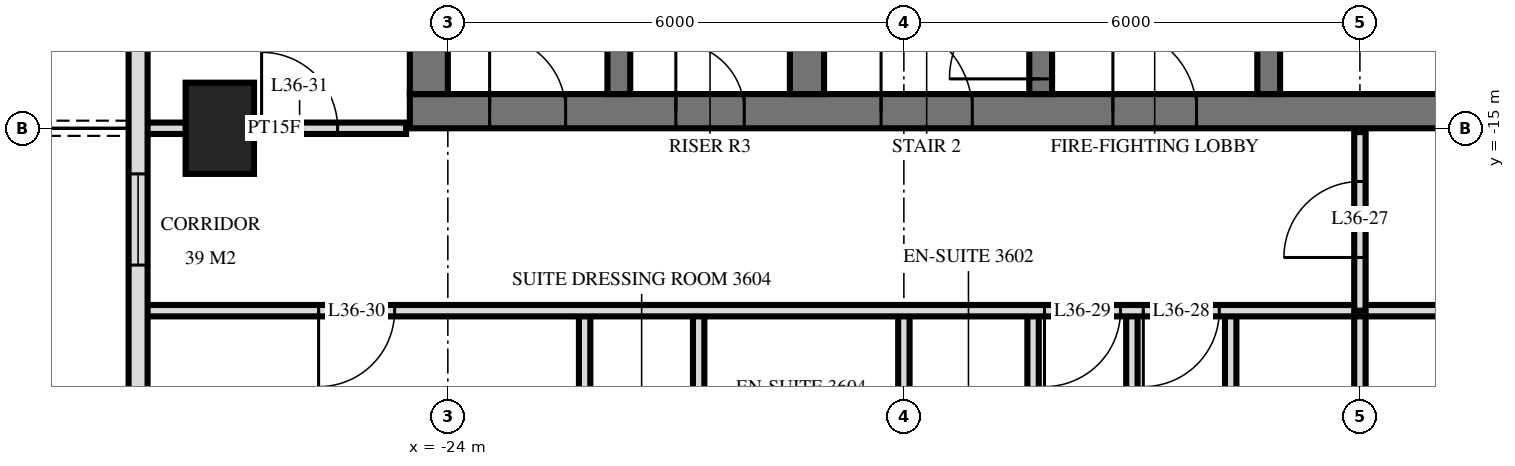
"""IFC4 building model, lengths in metres.
Left out: names, types, materials, properties, quantities, classifications, styles, units other than length and angle.
Written with IfcOpenShell. Run it as: python <this file> out.ifc"""

import sys

from ifc_helpers import new_model, si_unit, direction, frame, frame_2d, origin, origin_2d, place, context, subcontext, project, spatial, rectangle, extrude, element, fill, save


model = new_model("IFC4")
c1 = context("Model", 3, precision=1e-05, world=origin(), true_north=direction((0.0, 1.0)))
c2 = subcontext(c1, "Body", "Model", "MODEL_VIEW")
j1 = project(units=[si_unit("LENGTHUNIT", "METRE"), si_unit("PLANEANGLEUNIT", "RADIAN")], contexts=[c1])
p1 = place(None, origin())
s1 = spatial("IfcSite", under=j1, at=p1, CompositionType="ELEMENT")
p2 = place(p1, origin())
s2 = spatial("IfcBuilding", under=s1, at=p2, CompositionType="ELEMENT")
p3 = place(p2, frame((0.0, 0.0, 141.6)))
s3 = spatial("IfcBuildingStorey", under=s2, at=p3, CompositionType="ELEMENT", Elevation=141.6)
p4 = place(p3, frame((-27.0, -15.0, 0.0), z_axis=(0.0, 0.0, 1.0), x_axis=(0.0, 1.0, 0.0)))
e1 = element("IfcColumn", 1, at=p4, inside=s3, PredefinedType="COLUMN", context=c2, shape_type="SweptSolid", body=[
    extrude(rectangle(XDim=1.2, YDim=0.9, at=origin_2d()), origin(), (0.0, 0.0, 1.0), 3.6),
])
p5 = place(p3, frame((-24.5, -14.775, 0.0), z_axis=(0.0, 0.0, 1.0), x_axis=(1.0, 0.0, 0.0)))
e2 = element("IfcWall", 2, at=p5, inside=s3, PredefinedType="SHEAR", context=c2, shape_type="SweptSolid", body=[
    extrude(rectangle(XDim=14.5, YDim=0.45, at=frame_2d((7.25, 0.0))), origin(), (0.0, 0.0, 1.0), 3.6),
])
p6 = place(p5, frame((6.2, 0.0, 0.0)))
e3 = element("IfcOpeningElement", 3, at=p6, cuts=e2, PredefinedType="OPENING", context=c2, shape_type="SweptSolid", body=[
    extrude(rectangle(XDim=1.2, YDim=2.1, at=frame_2d((0.6, 1.05))), frame((0.0, 0.235, 0.0), z_axis=(0.0, -1.0, 0.0), x_axis=(1.0, 0.0, 0.0)), (0.0, 0.0, 1.0), 0.47),
])
p7 = place(p5, frame((9.25, 0.0, 0.0)))
e4 = element("IfcOpeningElement", 4, at=p7, cuts=e2, PredefinedType="OPENING", context=c2, shape_type="SweptSolid", body=[
    extrude(rectangle(XDim=1.1, YDim=2.1, at=frame_2d((0.55, 1.05))), frame((0.0, 0.235, 0.0), z_axis=(0.0, -1.0, 0.0), x_axis=(1.0, 0.0, 0.0)), (0.0, 0.0, 1.0), 0.47),
])
p8 = place(p5, frame((3.5, 0.0, 0.0)))
e5 = element("IfcOpeningElement", 5, at=p8, cuts=e2, PredefinedType="OPENING", context=c2, shape_type="SweptSolid", body=[
    extrude(rectangle(XDim=0.9, YDim=2.1, at=frame_2d((0.45, 1.05))), frame((0.0, 0.235, 0.0), z_axis=(0.0, -1.0, 0.0), x_axis=(1.0, 0.0, 0.0)), (0.0, 0.0, 1.0), 0.47),
])
p9 = place(p5, frame((1.05, 0.0, 0.0)))
e6 = element("IfcOpeningElement", 6, at=p9, cuts=e2, PredefinedType="OPENING", context=c2, shape_type="SweptSolid", body=[
    extrude(rectangle(XDim=1.0, YDim=2.1, at=frame_2d((0.5, 1.05))), frame((0.0, 0.235, 0.0), z_axis=(0.0, -1.0, 0.0), x_axis=(1.0, 0.0, 0.0)), (0.0, 0.0, 1.0), 0.47),
])
p10 = place(p3, frame((-24.25, -14.55, 0.0), z_axis=(0.0, 0.0, 1.0), x_axis=(0.0, 1.0, 0.0)))
e7 = element("IfcWall", 7, at=p10, inside=s3, PredefinedType="SHEAR", context=c2, shape_type="SweptSolid", body=[
    extrude(rectangle(XDim=14.1, YDim=0.5, at=frame_2d((7.05, 0.0))), origin(), (0.0, 0.0, 1.0), 3.6),
])
p11 = place(p3, frame((-13.2, -14.55, 0.0), z_axis=(0.0, 0.0, 1.0), x_axis=(0.0, 1.0, 0.0)))
e8 = element("IfcWall", 8, at=p11, inside=s3, PredefinedType="SHEAR", context=c2, shape_type="SweptSolid", body=[
    extrude(rectangle(XDim=5.4, YDim=0.3, at=frame_2d((2.7, 0.0))), origin(), (0.0, 0.0, 1.0), 3.6),
])
p12 = place(p11, frame((4.0, 0.0, 0.0)))
e9 = element("IfcOpeningElement", 9, at=p12, cuts=e8, PredefinedType="OPENING", context=c2, shape_type="SweptSolid", body=[
    extrude(rectangle(XDim=1.2, YDim=2.1, at=frame_2d((0.6, 1.05))), frame((0.0, 0.16, 0.0), z_axis=(0.0, -1.0, 0.0), x_axis=(1.0, 0.0, 0.0)), (0.0, 0.0, 1.0), 0.32),
])
p13 = place(p3, frame((-16.2, -14.55, 0.0), z_axis=(0.0, 0.0, 1.0), x_axis=(0.0, 1.0, 0.0)))
e10 = element("IfcWall", 10, at=p13, inside=s3, PredefinedType="SHEAR", context=c2, shape_type="SweptSolid", body=[
    extrude(rectangle(XDim=5.4, YDim=0.3, at=frame_2d((2.7, 0.0))), origin(), (0.0, 0.0, 1.0), 3.6),
])
p14 = place(p13, frame((0.2, 0.0, 0.0)))
e11 = element("IfcOpeningElement", 11, at=p14, cuts=e10, PredefinedType="OPENING", context=c2, shape_type="SweptSolid", body=[
    extrude(rectangle(XDim=1.2, YDim=2.1, at=frame_2d((0.6, 1.05))), frame((0.0, 0.16, 0.0), z_axis=(0.0, -1.0, 0.0), x_axis=(1.0, 0.0, 0.0)), (0.0, 0.0, 1.0), 0.32),
])
p15 = place(p3, frame((-19.275, -14.55, 0.0), z_axis=(0.0, 0.0, 1.0), x_axis=(0.0, 1.0, 0.0)))
e12 = element("IfcWall", 12, at=p15, inside=s3, PredefinedType="SHEAR", context=c2, shape_type="SweptSolid", body=[
    extrude(rectangle(XDim=5.4, YDim=0.45, at=frame_2d((2.7, 0.0))), origin(), (0.0, 0.0, 1.0), 3.6),
])
p16 = place(p3, frame((-21.75, -14.55, 0.0), z_axis=(0.0, 0.0, 1.0), x_axis=(0.0, 1.0, 0.0)))
e13 = element("IfcWall", 13, at=p16, inside=s3, PredefinedType="SHEAR", context=c2, shape_type="SweptSolid", body=[
    extrude(rectangle(XDim=5.4, YDim=0.3, at=frame_2d((2.7, 0.0))), origin(), (0.0, 0.0, 1.0), 3.6),
])
p17 = place(p3, frame((-28.075, -3.325, 0.0), z_axis=(0.0, 0.0, 1.0), x_axis=(0.0, -1.0, 0.0)))
e14 = element("IfcWall", 14, at=p17, inside=s3, PredefinedType="SOLIDWALL", context=c2, shape_type="SweptSolid", body=[
    extrude(rectangle(XDim=25.951, YDim=0.25, at=frame_2d((12.975, 0.0))), origin(), (0.0, 0.0, 1.0), 3.32),
])
p18 = place(p17, frame((6.65, 0.0, 0.0)))
e15 = element("IfcOpeningElement", 15, at=p18, cuts=e14, PredefinedType="OPENING", context=c2, shape_type="SweptSolid", body=[
    extrude(rectangle(XDim=1.8, YDim=2.4, at=frame_2d((0.9, 1.2))), frame((0.0, 0.135, 0.0), z_axis=(0.0, -1.0, 0.0), x_axis=(1.0, 0.0, 0.0)), (0.0, 0.0, 1.0), 0.27),
])
p19 = place(p17, frame((12.275, 0.0, 0.3)))
e16 = element("IfcOpeningElement", 16, at=p19, cuts=e14, PredefinedType="OPENING", context=c2, shape_type="SweptSolid", body=[
    extrude(rectangle(XDim=1.2, YDim=2.1, at=frame_2d((0.6, 1.05))), frame((0.0, 0.135, 0.0), z_axis=(0.0, -1.0, 0.0), x_axis=(1.0, 0.0, 0.0)), (0.0, 0.0, 1.0), 0.27),
])
p20 = place(p17, frame((15.575, 0.0, 0.3)))
e17 = element("IfcOpeningElement", 17, at=p20, cuts=e14, PredefinedType="OPENING", context=c2, shape_type="SweptSolid", body=[
    extrude(rectangle(XDim=1.2, YDim=2.1, at=frame_2d((0.6, 1.05))), frame((0.0, 0.135, 0.0), z_axis=(0.0, -1.0, 0.0), x_axis=(1.0, 0.0, 0.0)), (0.0, 0.0, 1.0), 0.27),
])
p21 = place(p17, frame((18.175, 0.0, 0.0)))
e18 = element("IfcOpeningElement", 18, at=p21, cuts=e14, PredefinedType="OPENING", context=c2, shape_type="SweptSolid", body=[
    extrude(rectangle(XDim=1.8, YDim=2.4, at=frame_2d((0.9, 1.2))), frame((0.0, 0.135, 0.0), z_axis=(0.0, -1.0, 0.0), x_axis=(1.0, 0.0, 0.0)), (0.0, 0.0, 1.0), 0.27),
])
p22 = place(p17, frame((21.075, 0.0, 0.0)))
e19 = element("IfcOpeningElement", 19, at=p22, cuts=e14, PredefinedType="OPENING", context=c2, shape_type="SweptSolid", body=[
    extrude(rectangle(XDim=1.8, YDim=2.4, at=frame_2d((0.9, 1.2))), frame((0.0, 0.135, 0.0), z_axis=(0.0, -1.0, 0.0), x_axis=(1.0, 0.0, 0.0)), (0.0, 0.0, 1.0), 0.27),
])
p23 = place(p17, frame((23.825, 0.0, 0.3)))
e20 = element("IfcOpeningElement", 20, at=p23, cuts=e14, PredefinedType="OPENING", context=c2, shape_type="SweptSolid", body=[
    extrude(rectangle(XDim=1.8, YDim=2.1, at=frame_2d((0.9, 1.05))), frame((0.0, 0.135, 0.0), z_axis=(0.0, -1.0, 0.0), x_axis=(1.0, 0.0, 0.0)), (0.0, 0.0, 1.0), 0.27),
])
p24 = place(p3, frame((-12.0, -17.4, 0.0), z_axis=(0.0, 0.0, 1.0), x_axis=(0.0, 1.0, 0.0)))
e21 = element("IfcWall", 21, at=p24, inside=s3, PredefinedType="PARTITIONING", context=c2, shape_type="SweptSolid", body=[
    extrude(rectangle(XDim=2.35, YDim=0.15, at=frame_2d((1.175, 0.0))), origin(), (0.0, 0.0, 1.0), 3.32),
])
p25 = place(p24, frame((0.7, 0.0, 0.0)))
e22 = element("IfcOpeningElement", 22, at=p25, cuts=e21, PredefinedType="OPENING", context=c2, shape_type="SweptSolid", body=[
    extrude(rectangle(XDim=1.0, YDim=2.1, at=frame_2d((0.5, 1.05))), frame((0.0, 0.085, 0.0), z_axis=(0.0, -1.0, 0.0), x_axis=(1.0, 0.0, 0.0)), (0.0, 0.0, 1.0), 0.17),
])
p26 = place(p3, frame((-12.0, -33.62, 0.0), z_axis=(0.0, 0.0, 1.0), x_axis=(0.0, 1.0, 0.0)))
e23 = element("IfcWall", 23, at=p26, inside=s3, PredefinedType="PARTITIONING", context=c2, shape_type="SweptSolid", body=[
    extrude(rectangle(XDim=16.22, YDim=0.15, at=frame_2d((8.11, 0.0))), origin(), (0.0, 0.0, 1.0), 3.32),
])
p27 = place(p3, frame((-13.7, -21.2, 0.0), z_axis=(0.0, 0.0, 1.0), x_axis=(0.0, 1.0, 0.0)))
e24 = element("IfcWall", 24, at=p27, inside=s3, PredefinedType="PARTITIONING", context=c2, shape_type="SweptSolid", body=[
    extrude(rectangle(XDim=3.8, YDim=0.15, at=frame_2d((1.9, 0.0))), origin(), (0.0, 0.0, 1.0), 3.32),
])
p28 = place(p27, frame((1.5, 0.0, 0.0)))
e25 = element("IfcOpeningElement", 25, at=p28, cuts=e24, PredefinedType="OPENING", context=c2, shape_type="SweptSolid", body=[
    extrude(rectangle(XDim=0.8, YDim=2.1, at=frame_2d((0.4, 1.05))), frame((0.0, 0.085, 0.0), z_axis=(0.0, -1.0, 0.0), x_axis=(1.0, 0.0, 0.0)), (0.0, 0.0, 1.0), 0.17),
])
p29 = place(p3, frame((-15.0, -33.62, 0.0), z_axis=(0.0, 0.0, 1.0), x_axis=(0.0, 1.0, 0.0)))
e26 = element("IfcWall", 26, at=p29, inside=s3, PredefinedType="PARTITIONING", context=c2, shape_type="SweptSolid", body=[
    extrude(rectangle(XDim=16.22, YDim=0.15, at=frame_2d((8.11, 0.0))), origin(), (0.0, 0.0, 1.0), 3.32),
])
p30 = place(p3, frame((-16.3, -21.2, 0.0), z_axis=(0.0, 0.0, 1.0), x_axis=(0.0, 1.0, 0.0)))
e27 = element("IfcWall", 27, at=p30, inside=s3, PredefinedType="PARTITIONING", context=c2, shape_type="SweptSolid", body=[
    extrude(rectangle(XDim=3.8, YDim=0.15, at=frame_2d((1.9, 0.0))), origin(), (0.0, 0.0, 1.0), 3.32),
])
p31 = place(p30, frame((1.5, 0.0, 0.0)))
e28 = element("IfcOpeningElement", 28, at=p31, cuts=e27, PredefinedType="OPENING", context=c2, shape_type="SweptSolid", body=[
    extrude(rectangle(XDim=0.8, YDim=2.1, at=frame_2d((0.4, 1.05))), frame((0.0, 0.085, 0.0), z_axis=(0.0, -1.0, 0.0), x_axis=(1.0, 0.0, 0.0)), (0.0, 0.0, 1.0), 0.17),
])
p32 = place(p3, frame((-18.0, -33.62, 0.0), z_axis=(0.0, 0.0, 1.0), x_axis=(0.0, 1.0, 0.0)))
e29 = element("IfcWall", 29, at=p32, inside=s3, PredefinedType="PARTITIONING", context=c2, shape_type="SweptSolid", body=[
    extrude(rectangle(XDim=16.22, YDim=0.15, at=frame_2d((8.11, 0.0))), origin(), (0.0, 0.0, 1.0), 3.32),
])
p33 = place(p3, frame((-20.7, -20.4, 0.0), z_axis=(0.0, 0.0, 1.0), x_axis=(0.0, 1.0, 0.0)))
e30 = element("IfcWall", 30, at=p33, inside=s3, PredefinedType="PARTITIONING", context=c2, shape_type="SweptSolid", body=[
    extrude(rectangle(XDim=3.0, YDim=0.15, at=frame_2d((1.5, 0.0))), origin(), (0.0, 0.0, 1.0), 3.32),
])
p34 = place(p3, frame((-22.2, -20.4, 0.0), z_axis=(0.0, 0.0, 1.0), x_axis=(0.0, 1.0, 0.0)))
e31 = element("IfcWall", 31, at=p34, inside=s3, PredefinedType="PARTITIONING", context=c2, shape_type="SweptSolid", body=[
    extrude(rectangle(XDim=3.0, YDim=0.15, at=frame_2d((1.5, 0.0))), origin(), (0.0, 0.0, 1.0), 3.32),
])
p35 = place(p34, frame((1.05, 0.0, 0.0)))
e32 = element("IfcOpeningElement", 32, at=p35, cuts=e31, PredefinedType="OPENING", context=c2, shape_type="SweptSolid", body=[
    extrude(rectangle(XDim=0.9, YDim=2.1, at=frame_2d((0.45, 1.05))), frame((0.0, 0.085, 0.0), z_axis=(0.0, -1.0, 0.0), x_axis=(1.0, 0.0, 0.0)), (0.0, 0.0, 1.0), 0.17),
])
p36 = place(p3, frame((-28.02, -17.4, 0.0), z_axis=(0.0, 0.0, 1.0), x_axis=(1.0, 0.0, 0.0)))
e33 = element("IfcWall", 33, at=p36, inside=s3, PredefinedType="PARTITIONING", context=c2, shape_type="SweptSolid", body=[
    extrude(rectangle(XDim=56.04, YDim=0.15, at=frame_2d((28.02, 0.0))), origin(), (0.0, 0.0, 1.0), 3.32),
])
p37 = place(p36, frame((13.17, 0.0, 0.0)))
e34 = element("IfcOpeningElement", 34, at=p37, cuts=e33, PredefinedType="OPENING", context=c2, shape_type="SweptSolid", body=[
    extrude(rectangle(XDim=1.0, YDim=2.1, at=frame_2d((0.5, 1.05))), frame((0.0, 0.085, 0.0), z_axis=(0.0, -1.0, 0.0), x_axis=(1.0, 0.0, 0.0)), (0.0, 0.0, 1.0), 0.17),
])
p38 = place(p36, frame((11.87, 0.0, 0.0)))
e35 = element("IfcOpeningElement", 35, at=p38, cuts=e33, PredefinedType="OPENING", context=c2, shape_type="SweptSolid", body=[
    extrude(rectangle(XDim=1.0, YDim=2.1, at=frame_2d((0.5, 1.05))), frame((0.0, 0.085, 0.0), z_axis=(0.0, -1.0, 0.0), x_axis=(1.0, 0.0, 0.0)), (0.0, 0.0, 1.0), 0.17),
])
p39 = place(p36, frame((2.32, 0.0, 0.0)))
e36 = element("IfcOpeningElement", 36, at=p39, cuts=e33, PredefinedType="OPENING", context=c2, shape_type="SweptSolid", body=[
    extrude(rectangle(XDim=1.0, YDim=2.1, at=frame_2d((0.5, 1.05))), frame((0.0, 0.085, 0.0), z_axis=(0.0, -1.0, 0.0), x_axis=(1.0, 0.0, 0.0)), (0.0, 0.0, 1.0), 0.17),
])
p40 = place(p36, frame((40.17, 0.0, 0.0)))
e37 = element("IfcOpeningElement", 37, at=p40, cuts=e33, PredefinedType="OPENING", context=c2, shape_type="SweptSolid", body=[
    extrude(rectangle(XDim=1.0, YDim=2.1, at=frame_2d((0.5, 1.05))), frame((0.0, 0.085, 0.0), z_axis=(0.0, -1.0, 0.0), x_axis=(1.0, 0.0, 0.0)), (0.0, 0.0, 1.0), 0.17),
])
p41 = place(p36, frame((51.22, 0.0, 0.0)))
e38 = element("IfcOpeningElement", 38, at=p41, cuts=e33, PredefinedType="OPENING", context=c2, shape_type="SweptSolid", body=[
    extrude(rectangle(XDim=1.0, YDim=2.1, at=frame_2d((0.5, 1.05))), frame((0.0, 0.085, 0.0), z_axis=(0.0, -1.0, 0.0), x_axis=(1.0, 0.0, 0.0)), (0.0, 0.0, 1.0), 0.17),
])
p42 = place(p36, frame((18.52, 0.0, 0.0)))
e39 = element("IfcOpeningElement", 39, at=p42, cuts=e33, PredefinedType="OPENING", context=c2, shape_type="SweptSolid", body=[
    extrude(rectangle(XDim=1.0, YDim=2.1, at=frame_2d((0.5, 1.05))), frame((0.0, 0.085, 0.0), z_axis=(0.0, -1.0, 0.0), x_axis=(1.0, 0.0, 0.0)), (0.0, 0.0, 1.0), 0.17),
])
p43 = place(p36, frame((26.02, 0.0, 0.0)))
e40 = element("IfcOpeningElement", 40, at=p43, cuts=e33, PredefinedType="OPENING", context=c2, shape_type="SweptSolid", body=[
    extrude(rectangle(XDim=1.0, YDim=2.1, at=frame_2d((0.5, 1.05))), frame((0.0, 0.085, 0.0), z_axis=(0.0, -1.0, 0.0), x_axis=(1.0, 0.0, 0.0)), (0.0, 0.0, 1.0), 0.17),
])
p44 = place(p36, frame((35.02, 0.0, 0.0)))
e41 = element("IfcOpeningElement", 41, at=p44, cuts=e33, PredefinedType="OPENING", context=c2, shape_type="SweptSolid", body=[
    extrude(rectangle(XDim=1.0, YDim=2.1, at=frame_2d((0.5, 1.05))), frame((0.0, 0.085, 0.0), z_axis=(0.0, -1.0, 0.0), x_axis=(1.0, 0.0, 0.0)), (0.0, 0.0, 1.0), 0.17),
])
p45 = place(p3, frame((-28.02, -15.0, 0.0), z_axis=(0.0, 0.0, 1.0), x_axis=(1.0, 0.0, 0.0)))
e42 = element("IfcWall", 42, at=p45, inside=s3, PredefinedType="PARTITIONING", context=c2, shape_type="SweptSolid", body=[
    extrude(rectangle(XDim=3.47, YDim=0.15, at=frame_2d((1.735, 0.0))), origin(), (0.0, 0.0, 1.0), 3.32),
])
p46 = place(p45, frame((1.57, 0.0, 0.0)))
e43 = element("IfcOpeningElement", 43, at=p46, cuts=e42, PredefinedType="OPENING", context=c2, shape_type="SweptSolid", body=[
    extrude(rectangle(XDim=1.0, YDim=2.1, at=frame_2d((0.5, 1.05))), frame((0.0, 0.085, 0.0), z_axis=(0.0, -1.0, 0.0), x_axis=(1.0, 0.0, 0.0)), (0.0, 0.0, 1.0), 0.17),
])
p47 = place(p19, origin())
e44 = element("IfcWindow", 44, at=p47, inside=s3, PartitioningType="SINGLE_PANEL", PredefinedType="WINDOW", context=c2, shape_type="SweptSolid", body=[
    extrude(rectangle(XDim=1.2, YDim=2.1, at=frame_2d((0.6, 1.05))), frame((0.0, 0.03, 0.0), z_axis=(0.0, -1.0, 0.0), x_axis=(1.0, 0.0, 0.0)), (0.0, 0.0, 1.0), 0.06),
])
fill(e16, e44)
p48 = place(p6, origin())
e45 = element("IfcDoor", 45, at=p48, inside=s3, OperationType="SINGLE_SWING_RIGHT", PredefinedType="DOOR", context=c2, shape_type="SweptSolid", body=[
    extrude(rectangle(XDim=1.2, YDim=2.1, at=frame_2d((0.6, 1.05))), frame((0.0, 0.025, 0.0), z_axis=(0.0, -1.0, 0.0), x_axis=(1.0, 0.0, 0.0)), (0.0, 0.0, 1.0), 0.05),
])
fill(e3, e45)
p49 = place(p7, origin())
e46 = element("IfcDoor", 46, at=p49, inside=s3, OperationType="SINGLE_SWING_RIGHT", PredefinedType="DOOR", context=c2, shape_type="SweptSolid", body=[
    extrude(rectangle(XDim=1.1, YDim=2.1, at=frame_2d((0.55, 1.05))), frame((0.0, 0.025, 0.0), z_axis=(0.0, -1.0, 0.0), x_axis=(1.0, 0.0, 0.0)), (0.0, 0.0, 1.0), 0.05),
])
fill(e4, e46)
p50 = place(p8, origin())
e47 = element("IfcDoor", 47, at=p50, inside=s3, OperationType="SINGLE_SWING_RIGHT", PredefinedType="DOOR", context=c2, shape_type="SweptSolid", body=[
    extrude(rectangle(XDim=0.9, YDim=2.1, at=frame_2d((0.45, 1.05))), frame((0.0, 0.025, 0.0), z_axis=(0.0, -1.0, 0.0), x_axis=(1.0, 0.0, 0.0)), (0.0, 0.0, 1.0), 0.05),
])
fill(e5, e47)
p51 = place(p9, origin())
e48 = element("IfcDoor", 48, at=p51, inside=s3, OperationType="SINGLE_SWING_RIGHT", PredefinedType="DOOR", context=c2, shape_type="SweptSolid", body=[
    extrude(rectangle(XDim=1.0, YDim=2.1, at=frame_2d((0.5, 1.05))), frame((0.0, 0.025, 0.0), z_axis=(0.0, -1.0, 0.0), x_axis=(1.0, 0.0, 0.0)), (0.0, 0.0, 1.0), 0.05),
])
fill(e6, e48)
p52 = place(p14, origin())
e49 = element("IfcDoor", 49, at=p52, inside=s3, OperationType="SINGLE_SWING_RIGHT", PredefinedType="DOOR", context=c2, shape_type="SweptSolid", body=[
    extrude(rectangle(XDim=1.2, YDim=2.1, at=frame_2d((0.6, 1.05))), frame((0.0, 0.025, 0.0), z_axis=(0.0, -1.0, 0.0), x_axis=(1.0, 0.0, 0.0)), (0.0, 0.0, 1.0), 0.05),
])
fill(e11, e49)
p53 = place(p25, origin())
e50 = element("IfcDoor", 50, at=p53, inside=s3, OperationType="SINGLE_SWING_RIGHT", PredefinedType="DOOR", context=c2, shape_type="SweptSolid", body=[
    extrude(rectangle(XDim=1.0, YDim=2.1, at=frame_2d((0.5, 1.05))), frame((0.0, 0.025, 0.0), z_axis=(0.0, -1.0, 0.0), x_axis=(1.0, 0.0, 0.0)), (0.0, 0.0, 1.0), 0.05),
])
fill(e22, e50)
p54 = place(p37, frame((0.5, 0.0, 0.0), z_axis=(0.0, 0.0, 1.0), x_axis=(-1.0, 0.0, 0.0)))
e51 = element("IfcDoor", 51, at=p54, inside=s3, OperationType="SINGLE_SWING_LEFT", PredefinedType="DOOR", context=c2, shape_type="SweptSolid", body=[
    extrude(rectangle(XDim=1.0, YDim=2.1, at=frame_2d((0.0, 1.05))), frame((0.0, -0.025, 0.0), z_axis=(0.0, 1.0, 0.0), x_axis=(-1.0, 0.0, 0.0)), (0.0, 0.0, 1.0), 0.05),
])
fill(e34, e51)
p55 = place(p38, frame((0.5, 0.0, 0.0), z_axis=(0.0, 0.0, 1.0), x_axis=(-1.0, 0.0, 0.0)))
e52 = element("IfcDoor", 52, at=p55, inside=s3, OperationType="SINGLE_SWING_LEFT", PredefinedType="DOOR", context=c2, shape_type="SweptSolid", body=[
    extrude(rectangle(XDim=1.0, YDim=2.1, at=frame_2d((0.0, 1.05))), frame((0.0, -0.025, 0.0), z_axis=(0.0, 1.0, 0.0), x_axis=(-1.0, 0.0, 0.0)), (0.0, 0.0, 1.0), 0.05),
])
fill(e35, e52)
p56 = place(p39, frame((0.5, 0.0, 0.0), z_axis=(0.0, 0.0, 1.0), x_axis=(-1.0, 0.0, 0.0)))
e53 = element("IfcDoor", 53, at=p56, inside=s3, OperationType="SINGLE_SWING_LEFT", PredefinedType="DOOR", context=c2, shape_type="SweptSolid", body=[
    extrude(rectangle(XDim=1.0, YDim=2.1, at=frame_2d((0.0, 1.05))), frame((0.0, -0.025, 0.0), z_axis=(0.0, 1.0, 0.0), x_axis=(-1.0, 0.0, 0.0)), (0.0, 0.0, 1.0), 0.05),
])
fill(e36, e53)
p57 = place(p46, origin())
e54 = element("IfcDoor", 54, at=p57, inside=s3, OperationType="SINGLE_SWING_RIGHT", PredefinedType="DOOR", context=c2, shape_type="SweptSolid", body=[
    extrude(rectangle(XDim=1.0, YDim=2.1, at=frame_2d((0.5, 1.05))), frame((0.0, 0.025, 0.0), z_axis=(0.0, -1.0, 0.0), x_axis=(1.0, 0.0, 0.0)), (0.0, 0.0, 1.0), 0.05),
])
fill(e43, e54)
save(model, sys.argv[1])
